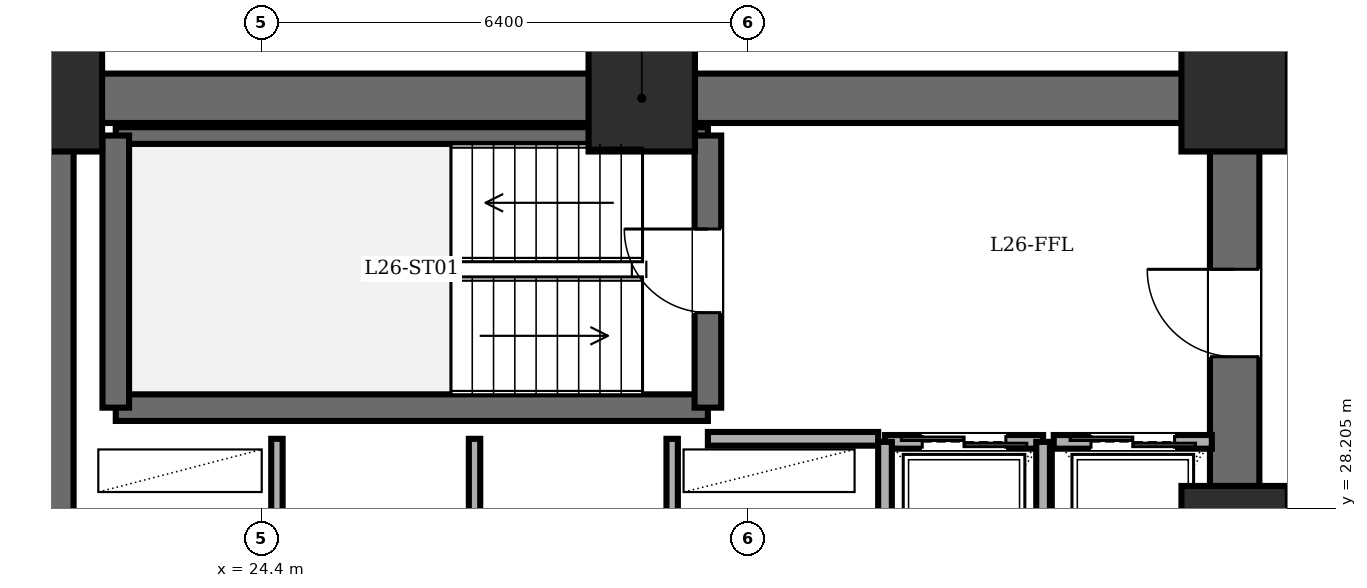
"""IFC4 building model, lengths in metres.
Left out: names, types, materials, properties, quantities, classifications, styles, units other than length and angle.
Written with IfcOpenShell. Run it as: python <this file> out.ifc"""

import sys

from ifc_helpers import new_model, si_unit, direction, frame, frame_2d, origin, origin_2d, place, context, subcontext, project, spatial, rectangle, extrude, element, fill, save


model = new_model("IFC4")
c1 = context("Model", 3, precision=1e-05, world=origin(), true_north=direction((0.0, 1.0)))
c2 = subcontext(c1, "Body", "Model", "MODEL_VIEW")
j1 = project(units=[si_unit("LENGTHUNIT", "METRE"), si_unit("PLANEANGLEUNIT", "RADIAN")], contexts=[c1])
p1 = place(None, origin())
s1 = spatial("IfcSite", under=j1, at=p1, CompositionType="ELEMENT")
p2 = place(p1, origin())
s2 = spatial("IfcBuilding", under=s1, at=p2, CompositionType="ELEMENT")
p3 = place(p2, frame((0.0, 0.0, 100.7)))
s3 = spatial("IfcBuildingStorey", under=s2, at=p3, CompositionType="ELEMENT", Elevation=100.7)
for number, where, z_axis, x_axis in (
    (1, (37.2, 27.8, 0.0), (0.0, 0.0, 1.0), (1.0, 0.0, 0.0)),
    (2, (37.2, 33.6, 0.0), (0.0, 0.0, 1.0), (1.0, 0.0, 0.0)),
    (3, (29.4, 33.6, 0.0), (0.0, 0.0, 1.0), (1.0, 0.0, 0.0)),
    (4, (21.6, 33.6, 0.0), (0.0, 0.0, 1.0), (1.0, 0.0, 0.0)),
):
    element("IfcColumn", number, at=place(p3, frame(where, z_axis=z_axis, x_axis=x_axis)), inside=s3, PredefinedType="COLUMN", context=c2, shape_type="SweptSolid", body=[
        extrude(rectangle(XDim=1.4, YDim=1.4, at=origin_2d()), origin(), (0.0, 0.0, 1.0), 3.6),
    ])
p4 = place(p3, frame((21.6, 14.4, 0.0), z_axis=(0.0, 0.0, 1.0), x_axis=(0.0, 1.0, 0.0)))
e5 = element("IfcWall", 5, at=p4, inside=s3, PredefinedType="SHEAR", context=c2, shape_type="SweptSolid", body=[
    extrude(rectangle(XDim=19.2, YDim=0.65, at=frame_2d((9.6, 0.0))), origin(), (0.0, 0.0, 1.0), 3.4),
])
p5 = place(p3, frame((21.6, 33.6, 0.0), z_axis=(0.0, 0.0, 1.0), x_axis=(1.0, 0.0, 0.0)))
e6 = element("IfcWall", 6, at=p5, inside=s3, PredefinedType="SHEAR", context=c2, shape_type="SweptSolid", body=[
    extrude(rectangle(XDim=15.6, YDim=0.65, at=frame_2d((7.8, 0.0))), origin(), (0.0, 0.0, 1.0), 3.4),
])
p6 = place(p3, frame((37.2, 14.4, 0.0), z_axis=(0.0, 0.0, 1.0), x_axis=(0.0, 1.0, 0.0)))
e7 = element("IfcWall", 7, at=p6, inside=s3, PredefinedType="SHEAR", context=c2, shape_type="SweptSolid", body=[
    extrude(rectangle(XDim=19.2, YDim=0.65, at=frame_2d((9.6, 0.0))), origin(), (0.0, 0.0, 1.0), 3.4),
])
p7 = place(p6, frame((15.8, 0.0, 0.0)))
e8 = element("IfcOpeningElement", 8, at=p7, cuts=e7, PredefinedType="OPENING", context=c2, shape_type="SweptSolid", body=[
    extrude(rectangle(XDim=1.15, YDim=2.15, at=frame_2d((0.575, 1.075))), frame((0.0, 0.335, 0.0), z_axis=(0.0, -1.0, 0.0), x_axis=(1.0, 0.0, 0.0)), (0.0, 0.0, 1.0), 0.67),
])
p8 = place(p6, frame((3.6, 0.0, 0.0)))
e9 = element("IfcOpeningElement", 9, at=p8, cuts=e7, PredefinedType="OPENING", context=c2, shape_type="SweptSolid", body=[
    extrude(rectangle(XDim=1.1, YDim=2.15, at=frame_2d((0.55, 1.075))), frame((0.0, 0.335, 0.0), z_axis=(0.0, -1.0, 0.0), x_axis=(1.0, 0.0, 0.0)), (0.0, 0.0, 1.0), 0.67),
])
p9 = place(p6, frame((8.6, 0.0, 0.0)))
e10 = element("IfcOpeningElement", 10, at=p9, cuts=e7, PredefinedType="OPENING", context=c2, shape_type="SweptSolid", body=[
    extrude(rectangle(XDim=1.3, YDim=2.2, at=frame_2d((0.65, 1.1))), frame((0.0, 0.335, 0.0), z_axis=(0.0, -1.0, 0.0), x_axis=(1.0, 0.0, 0.0)), (0.0, 0.0, 1.0), 0.67),
])
p10 = place(p3, frame((22.48, 29.53, 0.0), z_axis=(0.0, 0.0, 1.0), x_axis=(1.0, 0.0, 0.0)))
e11 = element("IfcWall", 11, at=p10, inside=s3, PredefinedType="SOLIDWALL", context=c2, shape_type="SweptSolid", body=[
    extrude(rectangle(XDim=7.79, YDim=0.35, at=frame_2d((3.895, 0.0))), origin(), (0.0, 0.0, 1.0), 3.4),
])
p11 = place(p3, frame((22.48, 33.11, 0.0), z_axis=(0.0, 0.0, 1.0), x_axis=(1.0, 0.0, 0.0)))
e12 = element("IfcWall", 12, at=p11, inside=s3, PredefinedType="PARTITIONING", context=c2, shape_type="SweptSolid", body=[
    extrude(rectangle(XDim=7.79, YDim=0.22, at=frame_2d((3.895, 0.0))), origin(), (0.0, 0.0, 1.0), 3.4),
])
p12 = place(p3, frame((22.48, 29.53, 0.0), z_axis=(0.0, 0.0, 1.0), x_axis=(0.0, 1.0, 0.0)))
e13 = element("IfcWall", 13, at=p12, inside=s3, PredefinedType="SOLIDWALL", context=c2, shape_type="SweptSolid", body=[
    extrude(rectangle(XDim=3.58, YDim=0.35, at=frame_2d((1.79, 0.0))), origin(), (0.0, 0.0, 1.0), 3.4),
])
p13 = place(p3, frame((30.27, 29.53, 0.0), z_axis=(0.0, 0.0, 1.0), x_axis=(0.0, 1.0, 0.0)))
e14 = element("IfcWall", 14, at=p13, inside=s3, PredefinedType="SOLIDWALL", context=c2, shape_type="SweptSolid", body=[
    extrude(rectangle(XDim=3.58, YDim=0.35, at=frame_2d((1.79, 0.0))), origin(), (0.0, 0.0, 1.0), 3.4),
])
p14 = place(p13, frame((1.25, 0.0, 0.0)))
e15 = element("IfcOpeningElement", 15, at=p14, cuts=e14, PredefinedType="OPENING", context=c2, shape_type="SweptSolid", body=[
    extrude(rectangle(XDim=1.1, YDim=2.15, at=frame_2d((0.55, 1.075))), frame((0.0, 0.185, 0.0), z_axis=(0.0, -1.0, 0.0), x_axis=(1.0, 0.0, 0.0)), (0.0, 0.0, 1.0), 0.37),
])
p15 = place(p3, frame((30.27, 29.12, 0.0), z_axis=(0.0, 0.0, 1.0), x_axis=(1.0, 0.0, 0.0)))
e16 = element("IfcWall", 16, at=p15, inside=s3, PredefinedType="PARTITIONING", context=c2, shape_type="SweptSolid", body=[
    extrude(rectangle(XDim=2.24, YDim=0.18, at=frame_2d((1.12, 0.0))), origin(), (0.0, 0.0, 1.0), 3.4),
])
for number, where, z_axis, x_axis in (
    (17, (24.6, 27.6, 0.0), (0.0, 0.0, 1.0), (0.0, 1.0, 0.0)),
    (18, (27.2, 27.6, 0.0), (0.0, 0.0, 1.0), (0.0, 1.0, 0.0)),
    (19, (29.8, 27.6, 0.0), (0.0, 0.0, 1.0), (0.0, 1.0, 0.0)),
):
    element("IfcWall", number, at=place(p3, frame(where, z_axis=z_axis, x_axis=x_axis)), inside=s3, PredefinedType="PARTITIONING", context=c2, shape_type="SweptSolid", body=[
        extrude(rectangle(XDim=1.52, YDim=0.15, at=frame_2d((0.76, 0.0))), origin(), (0.0, 0.0, 1.0), 3.4),
    ])
p16 = place(p3, frame((32.6, 29.08, 0.0), z_axis=(0.0, 0.0, 1.0), x_axis=(1.0, 0.0, 0.0)))
e20 = element("IfcWall", 20, at=p16, inside=s3, PredefinedType="PARTITIONING", context=c2, shape_type="SweptSolid", body=[
    extrude(rectangle(XDim=2.08, YDim=0.18, at=frame_2d((1.04, 0.0))), origin(), (0.0, 0.0, 1.0), 3.4),
])
p17 = place(p16, frame((0.49, 0.0, 0.0)))
e21 = element("IfcOpeningElement", 21, at=p17, cuts=e20, PredefinedType="OPENING", context=c2, shape_type="SweptSolid", body=[
    extrude(rectangle(XDim=1.1, YDim=2.2, at=frame_2d((0.55, 1.1))), frame((0.0, 0.1, 0.0), z_axis=(0.0, -1.0, 0.0), x_axis=(1.0, 0.0, 0.0)), (0.0, 0.0, 1.0), 0.2),
])
for number, where, z_axis, x_axis in (
    (22, (34.68, 26.35, 0.0), (0.0, 0.0, 1.0), (0.0, 1.0, 0.0)),
    (23, (32.6, 29.08, 0.0), (0.0, 0.0, 1.0), (0.0, -1.0, 0.0)),
):
    element("IfcWall", number, at=place(p3, frame(where, z_axis=z_axis, x_axis=x_axis)), inside=s3, PredefinedType="PARTITIONING", context=c2, shape_type="SweptSolid", body=[
        extrude(rectangle(XDim=2.73, YDim=0.18, at=frame_2d((1.365, 0.0))), origin(), (0.0, 0.0, 1.0), 3.4),
    ])
p18 = place(p3, frame((34.82, 29.08, 0.0), z_axis=(0.0, 0.0, 1.0), x_axis=(1.0, 0.0, 0.0)))
e24 = element("IfcWall", 24, at=p18, inside=s3, PredefinedType="PARTITIONING", context=c2, shape_type="SweptSolid", body=[
    extrude(rectangle(XDim=2.08, YDim=0.18, at=frame_2d((1.04, 0.0))), origin(), (0.0, 0.0, 1.0), 3.4),
])
p19 = place(p18, frame((0.49, 0.0, 0.0)))
e25 = element("IfcOpeningElement", 25, at=p19, cuts=e24, PredefinedType="OPENING", context=c2, shape_type="SweptSolid", body=[
    extrude(rectangle(XDim=1.1, YDim=2.2, at=frame_2d((0.55, 1.1))), frame((0.0, 0.1, 0.0), z_axis=(0.0, -1.0, 0.0), x_axis=(1.0, 0.0, 0.0)), (0.0, 0.0, 1.0), 0.2),
])
p20 = place(p14, origin())
e26 = element("IfcDoor", 26, at=p20, inside=s3, OperationType="SINGLE_SWING_RIGHT", PredefinedType="DOOR", context=c2, shape_type="SweptSolid", body=[
    extrude(rectangle(XDim=1.1, YDim=2.15, at=frame_2d((0.55, 1.075))), frame((0.0, 0.025, 0.0), z_axis=(0.0, -1.0, 0.0), x_axis=(1.0, 0.0, 0.0)), (0.0, 0.0, 1.0), 0.05),
])
fill(e15, e26)
p21 = place(p7, origin())
e27 = element("IfcDoor", 27, at=p21, inside=s3, OperationType="SINGLE_SWING_RIGHT", PredefinedType="DOOR", context=c2, shape_type="SweptSolid", body=[
    extrude(rectangle(XDim=1.15, YDim=2.15, at=frame_2d((0.575, 1.075))), frame((0.0, 0.025, 0.0), z_axis=(0.0, -1.0, 0.0), x_axis=(1.0, 0.0, 0.0)), (0.0, 0.0, 1.0), 0.05),
])
fill(e8, e27)
p22 = place(p17, origin())
e28 = element("IfcDoor", 28, at=p22, inside=s3, OperationType="DOUBLE_DOOR_SLIDING", PredefinedType="DOOR", context=c2, shape_type="SweptSolid", body=[
    extrude(rectangle(XDim=1.1, YDim=2.2, at=frame_2d((0.55, 1.1))), frame((0.0, 0.025, 0.0), z_axis=(0.0, -1.0, 0.0), x_axis=(1.0, 0.0, 0.0)), (0.0, 0.0, 1.0), 0.05),
])
fill(e21, e28)
p23 = place(p19, origin())
e29 = element("IfcDoor", 29, at=p23, inside=s3, OperationType="DOUBLE_DOOR_SLIDING", PredefinedType="DOOR", context=c2, shape_type="SweptSolid", body=[
    extrude(rectangle(XDim=1.1, YDim=2.2, at=frame_2d((0.55, 1.1))), frame((0.0, 0.025, 0.0), z_axis=(0.0, -1.0, 0.0), x_axis=(1.0, 0.0, 0.0)), (0.0, 0.0, 1.0), 0.05),
])
fill(e25, e29)
save(model, sys.argv[1])
